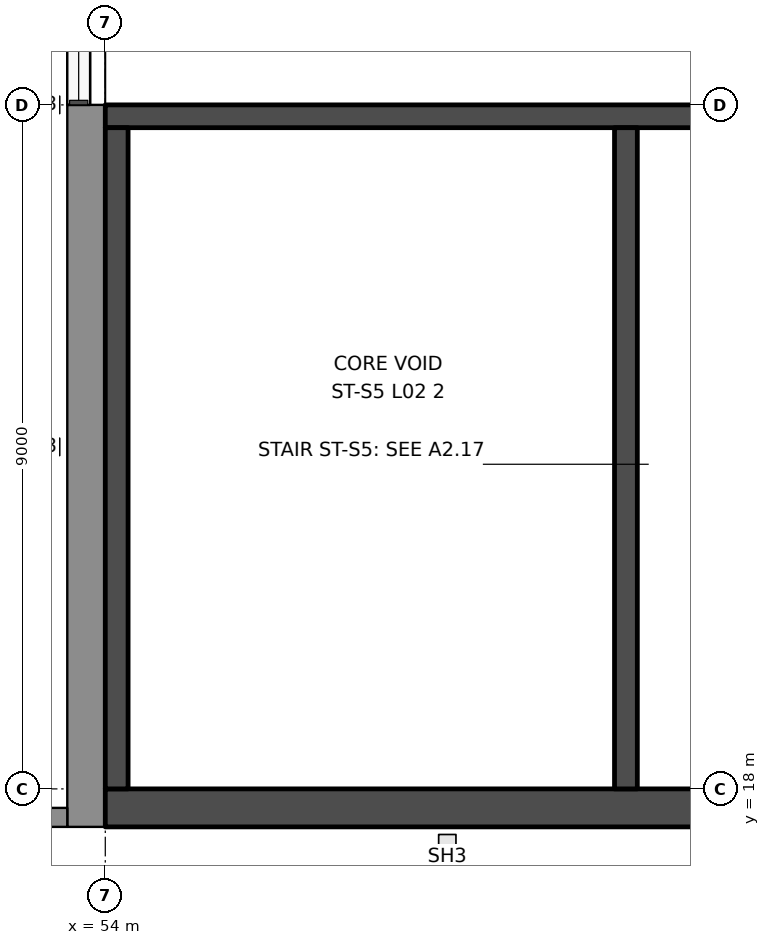
"""IFC4 building model, lengths in metres.
Left out: names, types, materials, properties, quantities, classifications, styles, units other than length and angle.
Written with IfcOpenShell. Run it as: python <this file> out.ifc"""

import sys

from ifc_helpers import new_model, si_unit, direction, frame, frame_2d, origin, place, context, subcontext, project, spatial, rectangle, extrude, element, save


model = new_model("IFC4")
c1 = context("Model", 3, precision=1e-05, world=origin(), true_north=direction((0.0, 1.0)))
c2 = subcontext(c1, "Body", "Model", "MODEL_VIEW")
j1 = project(units=[si_unit("LENGTHUNIT", "METRE"), si_unit("PLANEANGLEUNIT", "RADIAN")], contexts=[c1])
p1 = place(None, origin())
s1 = spatial("IfcSite", under=j1, at=p1, CompositionType="ELEMENT")
p2 = place(p1, origin())
s2 = spatial("IfcBuilding", under=s1, at=p2, CompositionType="ELEMENT")
p3 = place(p2, frame((0.0, 0.0, 11.5)))
s3 = spatial("IfcBuildingStorey", under=s2, at=p3, CompositionType="ELEMENT", Elevation=11.5)
p4 = place(p3, frame((53.75, 27.0, 0.0), z_axis=(0.0, 0.0, 1.0), x_axis=(0.0, -1.0, 0.0)))
e1 = element("IfcWall", 1, at=p4, inside=s3, PredefinedType="SOLIDWALL", context=c2, shape_type="SweptSolid", body=[
    extrude(rectangle(XDim=9.5, YDim=0.5, at=frame_2d((4.75, 0.0))), origin(), (0.0, 0.0, 1.0), 10.5),
])
p5 = place(p3, frame((53.65, 35.55, 0.0), z_axis=(0.0, 0.0, 1.0), x_axis=(0.0, -1.0, 0.0)))
e2 = element("IfcWall", 2, at=p5, inside=s3, PredefinedType="SOLIDWALL", context=c2, shape_type="SweptSolid", body=[
    extrude(rectangle(XDim=8.55, YDim=0.3, at=frame_2d((4.275, 0.0))), origin(), (0.0, 0.0, 1.0), 1.0),
])
p6 = place(p3, frame((40.0, 17.625, 0.0), z_axis=(0.0, 0.0, 1.0), x_axis=(1.0, 0.0, 0.0)))
e3 = element("IfcWall", 3, at=p6, inside=s3, PredefinedType="PARAPET", context=c2, shape_type="SweptSolid", body=[
    extrude(rectangle(XDim=13.5, YDim=0.25, at=frame_2d((6.75, 0.0))), origin(), (0.0, 0.0, 1.0), 1.2),
])
p7 = place(p3, frame((72.0, 26.85, 0.0), z_axis=(0.0, 0.0, 1.0), x_axis=(-1.0, 0.0, 0.0)))
e4 = element("IfcWall", 4, at=p7, inside=s3, PredefinedType="SHEAR", context=c2, shape_type="SweptSolid", body=[
    extrude(rectangle(XDim=18.0, YDim=0.3, at=frame_2d((9.0, 0.0))), origin(), (0.0, 0.0, 1.0), 10.5),
])
p8 = place(p7, frame((8.6, 0.0, 0.0)))
e5 = element("IfcOpeningElement", 5, at=p8, cuts=e4, PredefinedType="OPENING", context=c2, shape_type="SweptSolid", body=[
    extrude(rectangle(XDim=1.2, YDim=2.1, at=frame_2d((0.6, 1.05))), frame((0.0, 0.16, 0.0), z_axis=(0.0, -1.0, 0.0), x_axis=(1.0, 0.0, 0.0)), (0.0, 0.0, 1.0), 0.32),
])
p9 = place(p3, frame((72.0, 17.75, 0.0), z_axis=(0.0, 0.0, 1.0), x_axis=(-1.0, 0.0, 0.0)))
e6 = element("IfcWall", 6, at=p9, inside=s3, PredefinedType="SHEAR", context=c2, shape_type="SweptSolid", body=[
    extrude(rectangle(XDim=18.0, YDim=0.5, at=frame_2d((9.0, 0.0))), origin(), (0.0, 0.0, 1.0), 10.5),
])
for number, where, z_axis, x_axis in (
    (7, (54.15, 26.7, 0.0), (0.0, 0.0, 1.0), (0.0, -1.0, 0.0)),
    (8, (60.85, 26.7, 0.0), (0.0, 0.0, 1.0), (0.0, -1.0, 0.0)),
):
    element("IfcWall", number, at=place(p3, frame(where, z_axis=z_axis, x_axis=x_axis)), inside=s3, PredefinedType="SHEAR", context=c2, shape_type="SweptSolid", body=[
        extrude(rectangle(XDim=8.7, YDim=0.3, at=frame_2d((4.35, 0.0))), origin(), (0.0, 0.0, 1.0), 10.5),
    ])
save(model, sys.argv[1])
